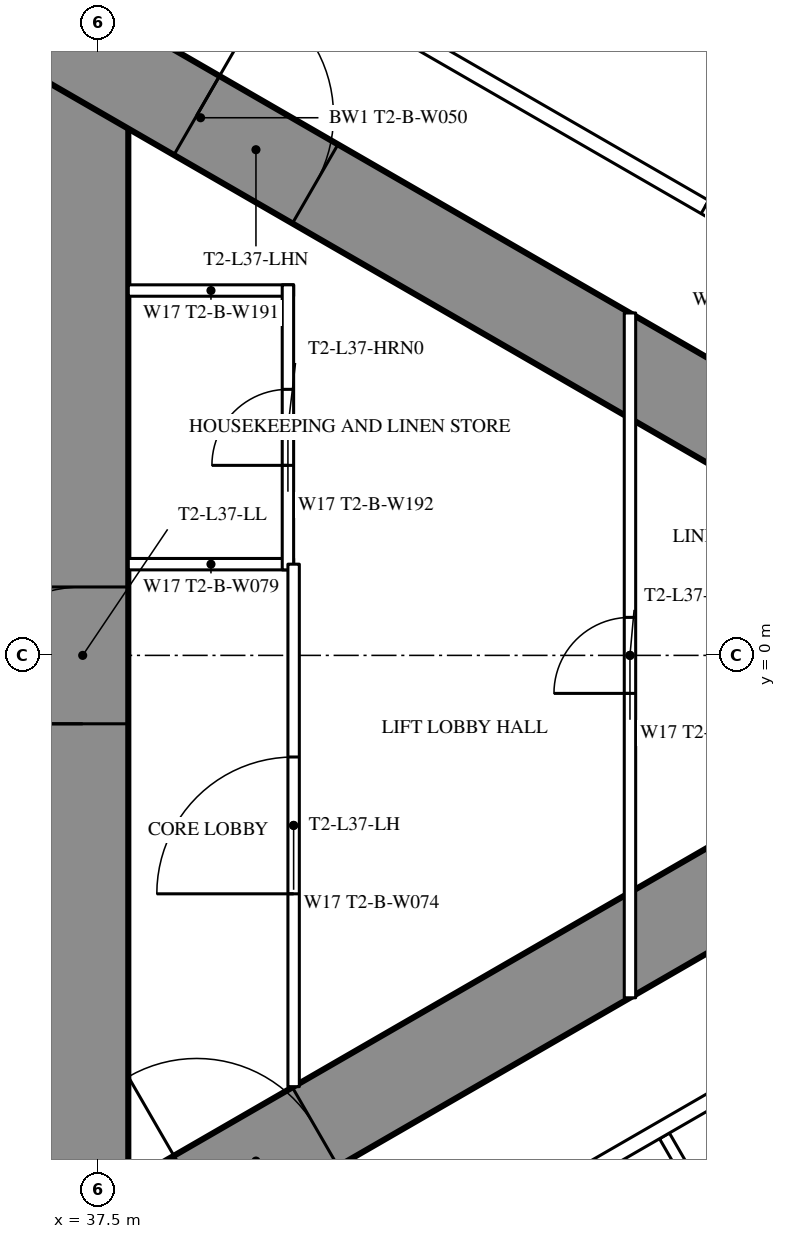
"""IFC4 building model, lengths in metres.
Left out: names, types, materials, properties, quantities, classifications, styles, units other than length and angle.
Written with IfcOpenShell. Run it as: python <this file> out.ifc"""

import sys

from ifc_helpers import new_model, si_unit, direction, frame, frame_2d, origin, place, context, subcontext, project, spatial, rectangle, extrude, element, fill, save


model = new_model("IFC4")
c1 = context("Model", 3, precision=1e-05, world=origin(), true_north=direction((0.0, 1.0)))
c2 = subcontext(c1, "Body", "Model", "MODEL_VIEW")
j1 = project(units=[si_unit("LENGTHUNIT", "METRE"), si_unit("PLANEANGLEUNIT", "RADIAN")], contexts=[c1])
p1 = place(None, origin())
s1 = spatial("IfcSite", under=j1, at=p1, CompositionType="ELEMENT")
p2 = place(p1, origin())
s2 = spatial("IfcBuilding", under=s1, at=p2, CompositionType="ELEMENT")
p3 = place(p2, frame((0.0, 0.0, 139.6)))
s3 = spatial("IfcBuildingStorey", under=s2, at=p3, CompositionType="ELEMENT", Elevation=139.6)
p4 = place(p3, frame((37.3, -8.6, 0.0), z_axis=(0.0, 0.0, 1.0), x_axis=(0.0, 1.0, 0.0)))
e1 = element("IfcWall", 1, at=p4, inside=s3, PredefinedType="SHEAR", context=c2, shape_type="SweptSolid", body=[
    extrude(rectangle(XDim=17.2, YDim=1.2, at=frame_2d((8.6, 0.0))), origin(), (0.0, 0.0, 1.0), 3.5),
])
p5 = place(p4, frame((7.7, 0.0, 0.0)))
e2 = element("IfcOpeningElement", 2, at=p5, cuts=e1, PredefinedType="OPENING", context=c2, shape_type="SweptSolid", body=[
    extrude(rectangle(XDim=1.8, YDim=2.2, at=frame_2d((0.9, 1.1))), frame((0.0, 0.61, 0.0), z_axis=(0.0, -1.0, 0.0), x_axis=(1.0, 0.0, 0.0)), (0.0, 0.0, 1.0), 1.22),
])
p6 = place(p3, frame((27.2, -13.8, 0.0), z_axis=(0.0, 0.0, 1.0), x_axis=(0.866027159892, 0.499996958321, 0.0)))
e3 = element("IfcWall", 3, at=p6, inside=s3, PredefinedType="SHEAR", context=c2, shape_type="SweptSolid", body=[
    extrude(rectangle(XDim=27.947, YDim=1.2, at=frame_2d((13.973, 0.0))), origin(), (0.0, 0.0, 1.0), 3.5),
])
p7 = place(p6, frame((4.6, 0.0, 0.0)))
e4 = element("IfcOpeningElement", 4, at=p7, cuts=e3, PredefinedType="OPENING", context=c2, shape_type="SweptSolid", body=[
    extrude(rectangle(XDim=1.0, YDim=2.2, at=frame_2d((0.5, 1.1))), frame((0.0, 0.61, 0.0), z_axis=(0.0, -1.0, 0.0), x_axis=(1.0, 0.0, 0.0)), (0.0, 0.0, 1.0), 1.22),
])
p8 = place(p6, frame((13.395, 0.0, 0.0)))
e5 = element("IfcOpeningElement", 5, at=p8, cuts=e3, PredefinedType="OPENING", context=c2, shape_type="SweptSolid", body=[
    extrude(rectangle(XDim=1.8, YDim=2.2, at=frame_2d((0.9, 1.1))), frame((0.0, 0.61, 0.0), z_axis=(0.0, -1.0, 0.0), x_axis=(1.0, 0.0, 0.0)), (0.0, 0.0, 1.0), 1.22),
])
p9 = place(p3, frame((27.2, 13.8, 0.0), z_axis=(0.0, 0.0, 1.0), x_axis=(0.866024515034, -0.500001539357, 0.0)))
e6 = element("IfcWall", 6, at=p9, inside=s3, PredefinedType="SHEAR", context=c2, shape_type="SweptSolid", body=[
    extrude(rectangle(XDim=26.907, YDim=1.2, at=frame_2d((13.454, 0.0))), origin(), (0.0, 0.0, 1.0), 3.5),
])
p10 = place(p9, frame((4.6, 0.0, 0.0)))
e7 = element("IfcOpeningElement", 7, at=p10, cuts=e6, PredefinedType="OPENING", context=c2, shape_type="SweptSolid", body=[
    extrude(rectangle(XDim=1.0, YDim=2.2, at=frame_2d((0.5, 1.1))), frame((0.0, 0.61, 0.0), z_axis=(0.0, -1.0, 0.0), x_axis=(1.0, 0.0, 0.0)), (0.0, 0.0, 1.0), 1.22),
])
p11 = place(p9, frame((13.395, 0.0, 0.0)))
e8 = element("IfcOpeningElement", 8, at=p11, cuts=e6, PredefinedType="OPENING", context=c2, shape_type="SweptSolid", body=[
    extrude(rectangle(XDim=1.8, YDim=2.2, at=frame_2d((0.9, 1.1))), frame((0.0, 0.61, 0.0), z_axis=(0.0, -1.0, 0.0), x_axis=(1.0, 0.0, 0.0)), (0.0, 0.0, 1.0), 1.22),
])
p12 = place(p3, frame((44.954, -6.321, 0.0), z_axis=(0.0, 0.0, 1.0), x_axis=(0.500018676722, -0.866014620505, 0.0)))
e9 = element("IfcWall", 9, at=p12, inside=s3, PredefinedType="PARTITIONING", context=c2, shape_type="SweptSolid", body=[
    extrude(rectangle(XDim=8.704, YDim=0.15, at=frame_2d((4.352, 0.0))), origin(), (0.0, 0.0, 1.0), 2.2),
])
p13 = place(p3, frame((37.96, -10.243, 0.0), z_axis=(0.0, 0.0, 1.0), x_axis=(0.866026429433, 0.499998223521, 0.0)))
e10 = element("IfcWall", 10, at=p13, inside=s3, PredefinedType="PARTITIONING", context=c2, shape_type="SweptSolid", body=[
    extrude(rectangle(XDim=20.487, YDim=0.2, at=frame_2d((10.243, 0.0))), origin(), (0.0, 0.0, 1.0), 3.25),
])
p14 = place(p13, frame((10.743, 0.0, 0.0)))
e11 = element("IfcOpeningElement", 11, at=p14, cuts=e10, PredefinedType="OPENING", context=c2, shape_type="SweptSolid", body=[
    extrude(rectangle(XDim=0.95, YDim=2.2, at=frame_2d((0.475, 1.1))), frame((0.0, 0.11, 0.0), z_axis=(0.0, -1.0, 0.0), x_axis=(1.0, 0.0, 0.0)), (0.0, 0.0, 1.0), 0.22),
])
p15 = place(p13, frame((17.586, 0.0, 0.0)))
e12 = element("IfcOpeningElement", 12, at=p15, cuts=e10, PredefinedType="OPENING", context=c2, shape_type="SweptSolid", body=[
    extrude(rectangle(XDim=1.8, YDim=2.2, at=frame_2d((0.9, 1.1))), frame((0.0, 0.11, 0.0), z_axis=(0.0, -1.0, 0.0), x_axis=(1.0, 0.0, 0.0)), (0.0, 0.0, 1.0), 0.22),
])
p16 = place(p13, frame((0.6, 0.0, 0.0)))
e13 = element("IfcOpeningElement", 13, at=p16, cuts=e10, PredefinedType="OPENING", context=c2, shape_type="SweptSolid", body=[
    extrude(rectangle(XDim=0.95, YDim=2.2, at=frame_2d((0.475, 1.1))), frame((0.0, 0.11, 0.0), z_axis=(0.0, -1.0, 0.0), x_axis=(1.0, 0.0, 0.0)), (0.0, 0.0, 1.0), 0.22),
])
p17 = place(p3, frame((36.834, 10.894, 0.0), z_axis=(0.0, 0.0, 1.0), x_axis=(0.866028157229, -0.499995230863, 0.0)))
e14 = element("IfcWall", 14, at=p17, inside=s3, PredefinedType="PARTITIONING", context=c2, shape_type="SweptSolid", body=[
    extrude(rectangle(XDim=21.667, YDim=0.2, at=frame_2d((10.833, 0.0))), origin(), (0.0, 0.0, 1.0), 3.25),
])
p18 = place(p17, frame((20.117, 0.0, 0.0)))
e15 = element("IfcOpeningElement", 15, at=p18, cuts=e14, PredefinedType="OPENING", context=c2, shape_type="SweptSolid", body=[
    extrude(rectangle(XDim=0.95, YDim=2.2, at=frame_2d((0.475, 1.1))), frame((0.0, 0.11, 0.0), z_axis=(0.0, -1.0, 0.0), x_axis=(1.0, 0.0, 0.0)), (0.0, 0.0, 1.0), 0.22),
])
p19 = place(p17, frame((14.938, 0.0, 0.0)))
e16 = element("IfcOpeningElement", 16, at=p19, cuts=e14, PredefinedType="OPENING", context=c2, shape_type="SweptSolid", body=[
    extrude(rectangle(XDim=1.8, YDim=2.2, at=frame_2d((0.9, 1.1))), frame((0.0, 0.11, 0.0), z_axis=(0.0, -1.0, 0.0), x_axis=(1.0, 0.0, 0.0)), (0.0, 0.0, 1.0), 0.22),
])
p20 = place(p17, frame((9.99, 0.0, 0.0)))
e17 = element("IfcOpeningElement", 17, at=p20, cuts=e14, PredefinedType="OPENING", context=c2, shape_type="SweptSolid", body=[
    extrude(rectangle(XDim=0.95, YDim=2.2, at=frame_2d((0.475, 1.1))), frame((0.0, 0.11, 0.0), z_axis=(0.0, -1.0, 0.0), x_axis=(1.0, 0.0, 0.0)), (0.0, 0.0, 1.0), 0.22),
])
p21 = place(p17, frame((3.35, 0.0, 0.0)))
e18 = element("IfcOpeningElement", 18, at=p21, cuts=e14, PredefinedType="OPENING", context=c2, shape_type="SweptSolid", body=[
    extrude(rectangle(XDim=1.0, YDim=2.2, at=frame_2d((0.5, 1.1))), frame((0.0, 0.11, 0.0), z_axis=(0.0, -1.0, 0.0), x_axis=(1.0, 0.0, 0.0)), (0.0, 0.0, 1.0), 0.22),
])
for number, where, z_axis, x_axis in (
    (19, (37.9, 1.2, 0.0), (0.0, 0.0, 1.0), (1.0, 0.0, 0.0)),
    (20, (37.9, 4.8, 0.0), (0.0, 0.0, 1.0), (1.0, 0.0, 0.0)),
):
    element("IfcWall", number, at=place(p3, frame(where, z_axis=z_axis, x_axis=x_axis)), inside=s3, PredefinedType="PARTITIONING", context=c2, shape_type="SweptSolid", body=[
        extrude(rectangle(XDim=2.175, YDim=0.15, at=frame_2d((1.087, 0.0))), origin(), (0.0, 0.0, 1.0), 3.25),
    ])
p22 = place(p3, frame((40.0, 1.125, 0.0), z_axis=(0.0, 0.0, 1.0), x_axis=(0.0, 1.0, 0.0)))
e21 = element("IfcWall", 21, at=p22, inside=s3, PredefinedType="PARTITIONING", context=c2, shape_type="SweptSolid", body=[
    extrude(rectangle(XDim=3.75, YDim=0.15, at=frame_2d((1.875, 0.0))), origin(), (0.0, 0.0, 1.0), 3.25),
])
p23 = place(p22, frame((1.375, 0.0, 0.0)))
e22 = element("IfcOpeningElement", 22, at=p23, cuts=e21, PredefinedType="OPENING", context=c2, shape_type="SweptSolid", body=[
    extrude(rectangle(XDim=1.0, YDim=2.2, at=frame_2d((0.5, 1.1))), frame((0.0, 0.085, 0.0), z_axis=(0.0, -1.0, 0.0), x_axis=(1.0, 0.0, 0.0)), (0.0, 0.0, 1.0), 0.17),
])
p24 = place(p3, frame((40.075, -5.674, 0.0), z_axis=(0.0, 0.0, 1.0), x_axis=(0.0, 1.0, 0.0)))
e23 = element("IfcWall", 23, at=p24, inside=s3, PredefinedType="PARTITIONING", context=c2, shape_type="SweptSolid", body=[
    extrude(rectangle(XDim=6.874, YDim=0.15, at=frame_2d((3.437, 0.0))), origin(), (0.0, 0.0, 1.0), 3.25),
])
p25 = place(p24, frame((2.537, 0.0, 0.0)))
e24 = element("IfcOpeningElement", 24, at=p25, cuts=e23, PredefinedType="OPENING", context=c2, shape_type="SweptSolid", body=[
    extrude(rectangle(XDim=1.8, YDim=2.2, at=frame_2d((0.9, 1.1))), frame((0.0, 0.085, 0.0), z_axis=(0.0, -1.0, 0.0), x_axis=(1.0, 0.0, 0.0)), (0.0, 0.0, 1.0), 0.17),
])
p26 = place(p3, frame((44.5, -4.505, 0.0), z_axis=(0.0, 0.0, 1.0), x_axis=(0.0, 1.0, 0.0)))
e25 = element("IfcWall", 25, at=p26, inside=s3, PredefinedType="PARTITIONING", context=c2, shape_type="SweptSolid", body=[
    extrude(rectangle(XDim=9.009, YDim=0.15, at=frame_2d((4.505, 0.0))), origin(), (0.0, 0.0, 1.0), 2.45),
])
p27 = place(p26, frame((4.005, 0.0, 0.0)))
e26 = element("IfcOpeningElement", 26, at=p27, cuts=e25, PredefinedType="OPENING", context=c2, shape_type="SweptSolid", body=[
    extrude(rectangle(XDim=1.0, YDim=2.2, at=frame_2d((0.5, 1.1))), frame((0.0, 0.085, 0.0), z_axis=(0.0, -1.0, 0.0), x_axis=(1.0, 0.0, 0.0)), (0.0, 0.0, 1.0), 0.17),
])
p28 = place(p20, origin())
e27 = element("IfcDoor", 27, at=p28, inside=s3, OperationType="SINGLE_SWING_LEFT", PredefinedType="DOOR", context=c2, shape_type="SweptSolid", body=[
    extrude(rectangle(XDim=0.95, YDim=2.2, at=frame_2d((0.475, 1.1))), frame((0.0, 0.025, 0.0), z_axis=(0.0, -1.0, 0.0), x_axis=(1.0, 0.0, 0.0)), (0.0, 0.0, 1.0), 0.05),
])
fill(e17, e27)
p29 = place(p23, origin())
e28 = element("IfcDoor", 28, at=p29, inside=s3, OperationType="SINGLE_SWING_LEFT", PredefinedType="DOOR", context=c2, shape_type="SweptSolid", body=[
    extrude(rectangle(XDim=1.0, YDim=2.2, at=frame_2d((0.5, 1.1))), frame((0.0, 0.025, 0.0), z_axis=(0.0, -1.0, 0.0), x_axis=(1.0, 0.0, 0.0)), (0.0, 0.0, 1.0), 0.05),
])
fill(e22, e28)
p30 = place(p25, origin())
e29 = element("IfcDoor", 29, at=p30, inside=s3, OperationType="DOUBLE_DOOR_SINGLE_SWING", PredefinedType="DOOR", context=c2, shape_type="SweptSolid", body=[
    extrude(rectangle(XDim=1.8, YDim=2.2, at=frame_2d((0.9, 1.1))), frame((0.0, 0.025, 0.0), z_axis=(0.0, -1.0, 0.0), x_axis=(1.0, 0.0, 0.0)), (0.0, 0.0, 1.0), 0.05),
])
fill(e24, e29)
p31 = place(p27, origin())
e30 = element("IfcDoor", 30, at=p31, inside=s3, OperationType="SINGLE_SWING_LEFT", PredefinedType="DOOR", context=c2, shape_type="SweptSolid", body=[
    extrude(rectangle(XDim=1.0, YDim=2.2, at=frame_2d((0.5, 1.1))), frame((0.0, 0.025, 0.0), z_axis=(0.0, -1.0, 0.0), x_axis=(1.0, 0.0, 0.0)), (0.0, 0.0, 1.0), 0.05),
])
fill(e26, e30)
p32 = place(p8, origin())
e31 = element("IfcDoor", 31, at=p32, inside=s3, OperationType="DOUBLE_DOOR_SINGLE_SWING", PredefinedType="DOOR", context=c2, shape_type="SweptSolid", body=[
    extrude(rectangle(XDim=1.8, YDim=2.2, at=frame_2d((0.9, 1.1))), frame((0.0, 0.025, 0.0), z_axis=(0.0, -1.0, 0.0), x_axis=(1.0, 0.0, 0.0)), (0.0, 0.0, 1.0), 0.05),
])
fill(e5, e31)
p33 = place(p11, origin())
e32 = element("IfcDoor", 32, at=p33, inside=s3, OperationType="DOUBLE_DOOR_SINGLE_SWING", PredefinedType="DOOR", context=c2, shape_type="SweptSolid", body=[
    extrude(rectangle(XDim=1.8, YDim=2.2, at=frame_2d((0.9, 1.1))), frame((0.0, 0.025, 0.0), z_axis=(0.0, -1.0, 0.0), x_axis=(1.0, 0.0, 0.0)), (0.0, 0.0, 1.0), 0.05),
])
fill(e8, e32)
p34 = place(p5, origin())
e33 = element("IfcDoor", 33, at=p34, inside=s3, OperationType="DOUBLE_DOOR_SINGLE_SWING", PredefinedType="DOOR", context=c2, shape_type="SweptSolid", body=[
    extrude(rectangle(XDim=1.8, YDim=2.2, at=frame_2d((0.9, 1.1))), frame((0.0, 0.025, 0.0), z_axis=(0.0, -1.0, 0.0), x_axis=(1.0, 0.0, 0.0)), (0.0, 0.0, 1.0), 0.05),
])
fill(e2, e33)
save(model, sys.argv[1])
